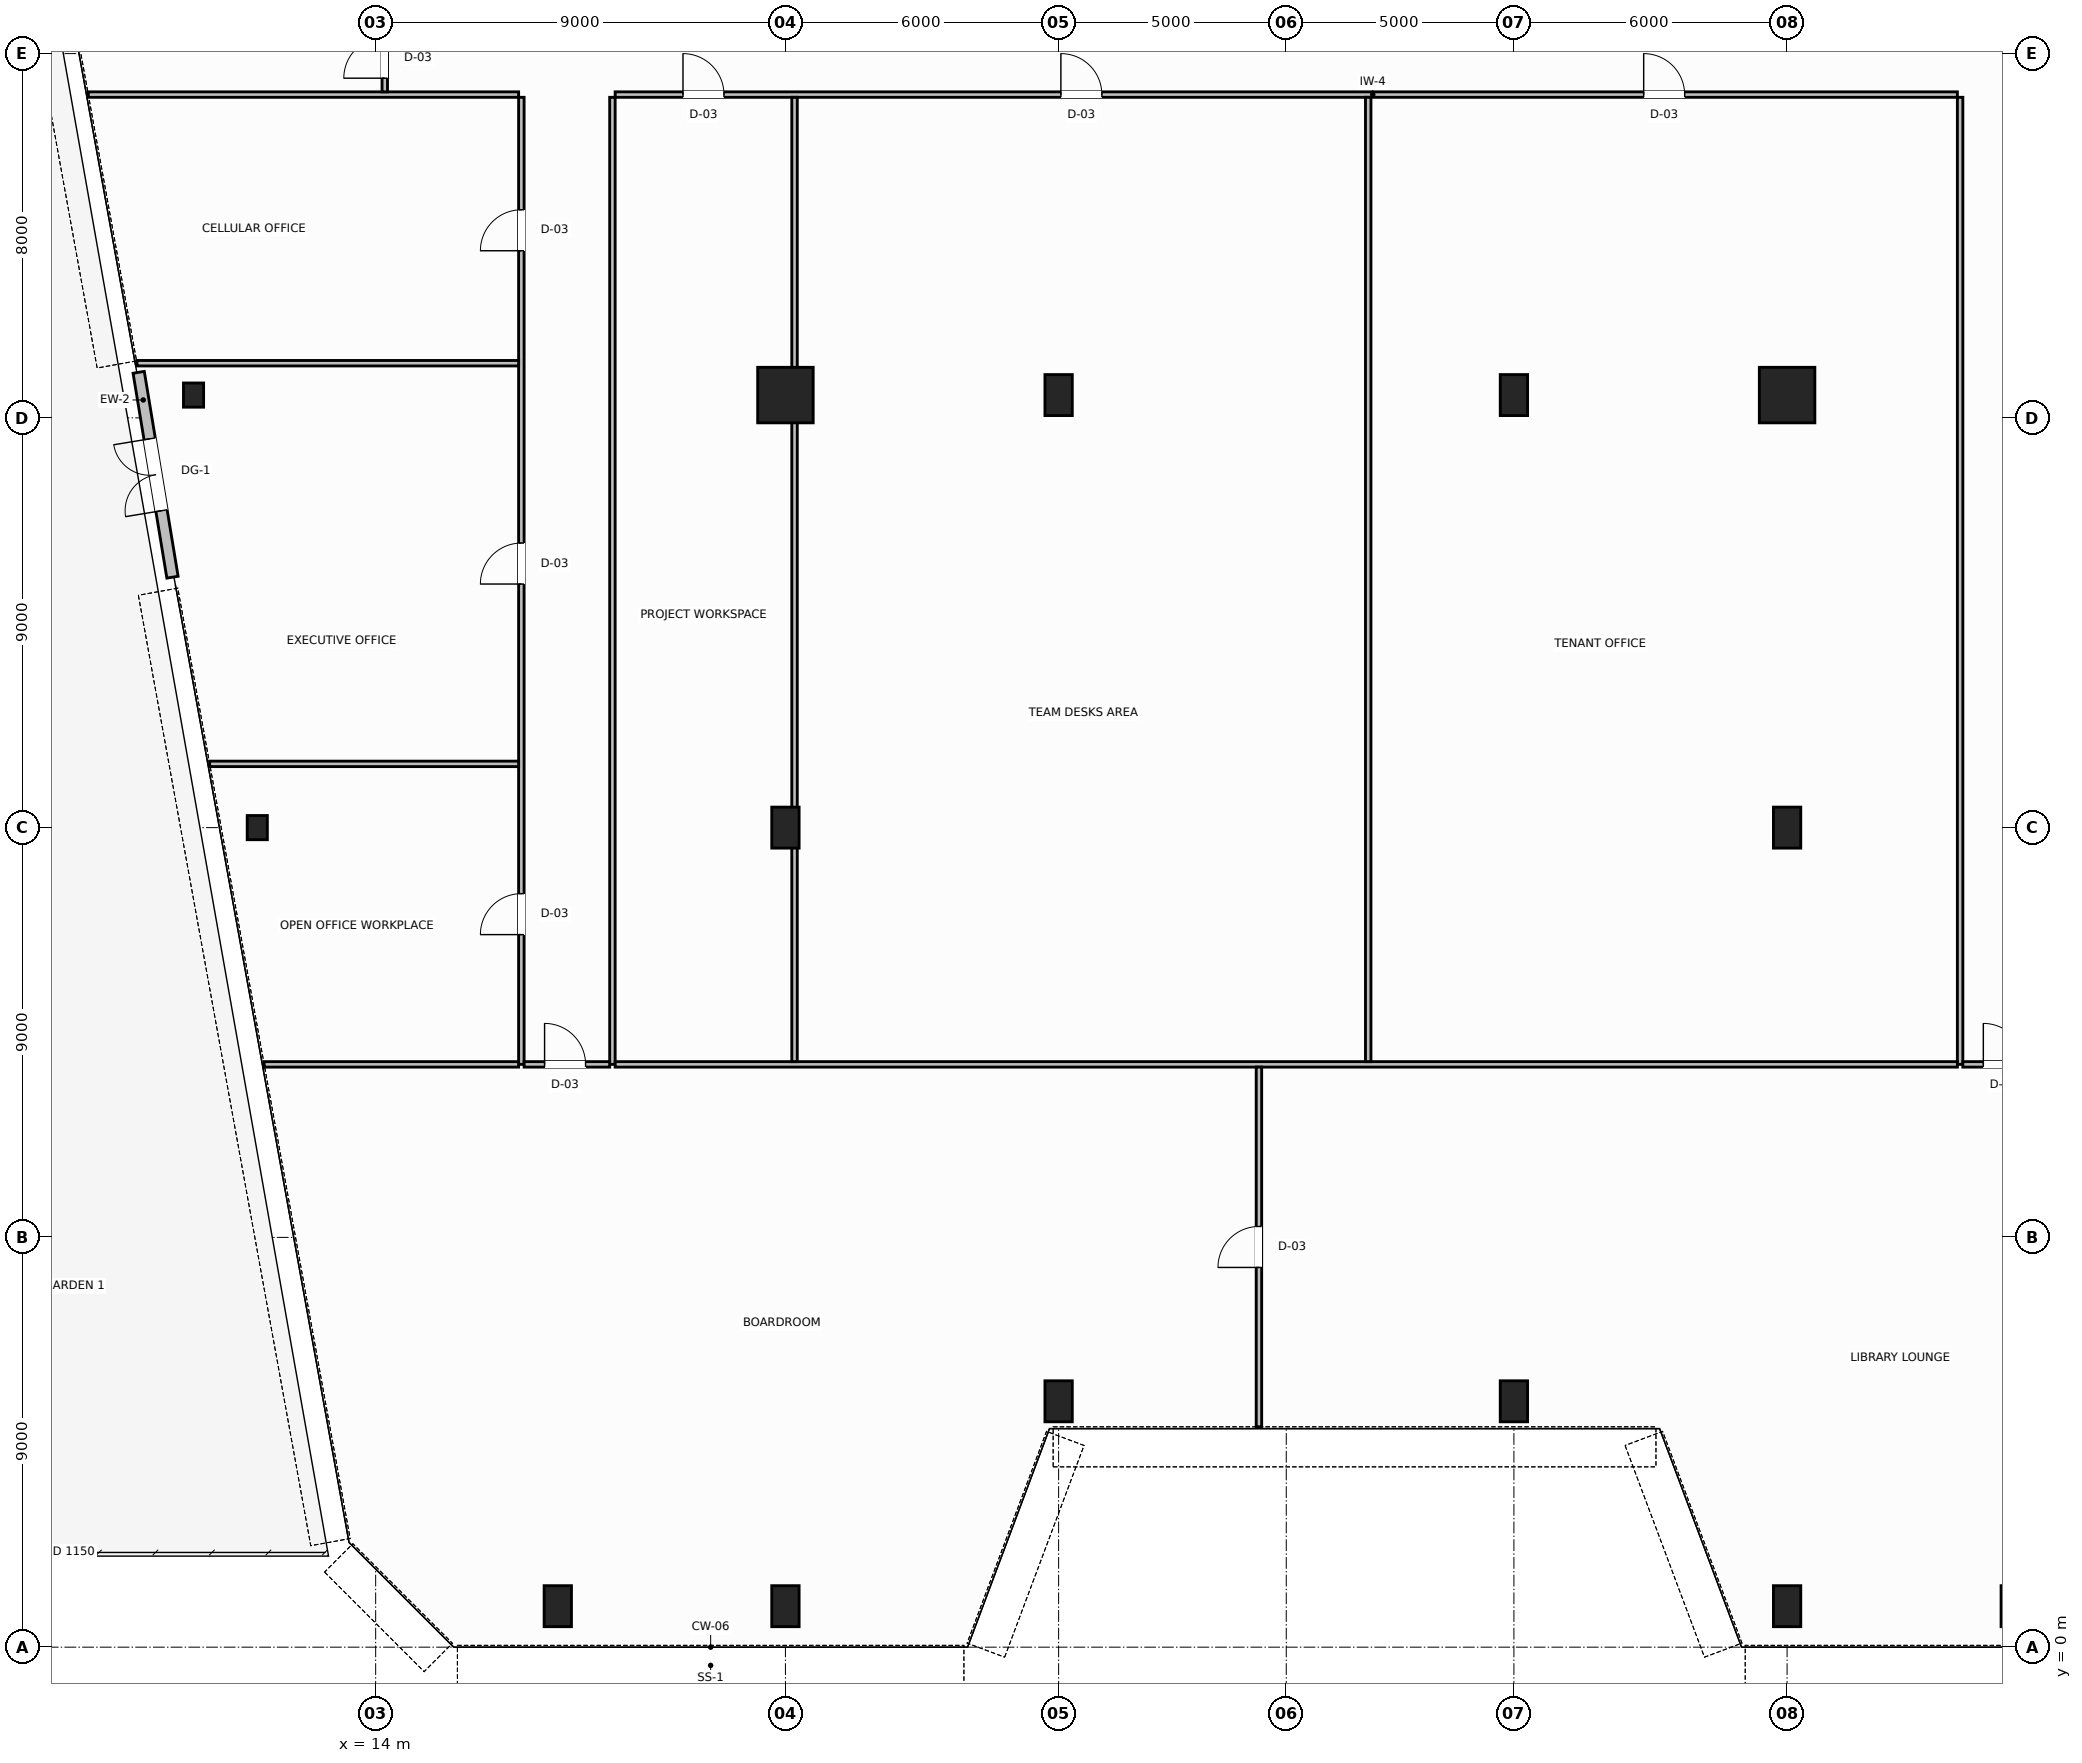
"""IFC4 building model, lengths in metres.
Left out: names, types, materials, properties, quantities, classifications, styles, units other than length and angle.
Written with IfcOpenShell. Run it as: python <this file> out.ifc"""

import sys

from ifc_helpers import new_model, si_unit, direction, frame, frame_2d, origin, origin_2d, place, context, subcontext, project, spatial, rectangle, hollow_rectangle, hollow_circle, i_section, extrude, source, transform, mapped, element, fill, save


model = new_model("IFC4")
c1 = context("Model", 3, precision=1e-05, world=origin(), true_north=direction((0.0, 1.0)))
c2 = subcontext(c1, "Body", "Model", "MODEL_VIEW")
j1 = project(units=[si_unit("LENGTHUNIT", "METRE"), si_unit("PLANEANGLEUNIT", "RADIAN")], contexts=[c1])
p1 = place(None, origin())
s1 = spatial("IfcSite", under=j1, at=p1, CompositionType="ELEMENT")
p2 = place(p1, origin())
s2 = spatial("IfcBuilding", under=s1, at=p2, CompositionType="ELEMENT")
p3 = place(p2, frame((0.0, 0.0, 18.8)))
s3 = spatial("IfcBuildingStorey", under=s2, at=p3, CompositionType="ELEMENT", Elevation=18.8)
m1 = source(origin(), c2, "Body", "SweptSolid", [
    extrude(i_section(OverallWidth=0.442, OverallDepth=0.531, WebThickness=0.065, FlangeThickness=0.076, FilletRadius=0.015, at=origin_2d()), origin(), (0.0, 0.0, 1.0), 3.8),
])
for number, where, z_axis, x_axis in (
    (1, (10.0, 27.5, 0.0), (0.0, 0.0, 1.0), (1.0, 0.0, 0.0)),
    (2, (11.4, 18.0, 0.0), (0.0, 0.0, 1.0), (1.0, 0.0, 0.0)),
):
    element("IfcColumn", number, at=place(p3, frame(where, z_axis=z_axis, x_axis=x_axis)), inside=s3, PredefinedType="COLUMN", context=c2, shape_type="MappedRepresentation", body=[
        mapped(m1, transform((0.0, 0.0, 0.0), scale=1.0)),
    ])
m2 = source(origin(), c2, "Body", "SweptSolid", [
    extrude(hollow_circle(Radius=0.61, WallThickness=0.05, at=origin_2d()), origin(), (0.0, 0.0, 1.0), 3.8),
])
p4 = place(p3, frame((23.0, 27.5, 0.0), z_axis=(0.0, 0.0, 1.0), x_axis=(1.0, 0.0, 0.0)))
e3 = element("IfcColumn", 3, at=p4, inside=s3, PredefinedType="COLUMN", context=c2, shape_type="MappedRepresentation", body=[
    mapped(m2, transform((0.0, 0.0, 0.0), scale=1.0)),
])
m3 = source(origin(), c2, "Body", "SweptSolid", [
    extrude(hollow_rectangle(XDim=0.6, YDim=0.9, WallThickness=0.04, InnerFilletRadius=0.04, OuterFilletRadius=0.08, at=origin_2d()), origin(), (0.0, 0.0, 1.0), 4.08),
])
for number, where, z_axis, x_axis in (
    (4, (29.0, 27.5, -0.28), (0.0, 0.0, 1.0), (1.0, 0.0, 0.0)),
    (5, (39.0, 27.5, -0.28), (0.0, 0.0, 1.0), (1.0, 0.0, 0.0)),
):
    element("IfcColumn", number, at=place(p3, frame(where, z_axis=z_axis, x_axis=x_axis)), inside=s3, PredefinedType="COLUMN", context=c2, shape_type="MappedRepresentation", body=[
        mapped(m3, transform((0.0, 0.0, 0.0), scale=1.0)),
    ])
p5 = place(p3, frame((45.0, 27.5, 0.0), z_axis=(0.0, 0.0, 1.0), x_axis=(1.0, 0.0, 0.0)))
e6 = element("IfcColumn", 6, at=p5, inside=s3, PredefinedType="COLUMN", context=c2, shape_type="MappedRepresentation", body=[
    mapped(m2, transform((0.0, 0.0, 0.0), scale=1.0)),
])
for number, where, z_axis, x_axis in (
    (7, (23.0, 18.0, -0.28), (0.0, 0.0, 1.0), (1.0, 0.0, 0.0)),
    (8, (45.0, 18.0, -0.28), (0.0, 0.0, 1.0), (1.0, 0.0, 0.0)),
):
    element("IfcColumn", number, at=place(p3, frame(where, z_axis=z_axis, x_axis=x_axis)), inside=s3, PredefinedType="COLUMN", context=c2, shape_type="MappedRepresentation", body=[
        mapped(m3, transform((0.0, 0.0, 0.0), scale=1.0)),
    ])
m4 = source(origin(), c2, "Body", "SweptSolid", [
    extrude(hollow_rectangle(XDim=0.6, YDim=0.9, WallThickness=0.04, InnerFilletRadius=0.04, OuterFilletRadius=0.08, at=origin_2d()), origin(), (0.0, 0.0, 1.0), 3.744),
])
for number, where, z_axis, x_axis in (
    (9, (18.0, 0.9, 0.032), (0.0, 0.064, 0.998), (-1.0, 0.0, 0.0)),
    (10, (23.0, 0.9, 0.032), (0.0, 0.064, 0.998), (-1.0, 0.0, 0.0)),
    (11, (29.0, 5.4, 0.032), (0.0, 0.064, 0.998), (-1.0, 0.0, 0.0)),
    (12, (39.0, 5.4, 0.032), (0.0, 0.064, 0.998), (-1.0, 0.0, 0.0)),
    (13, (45.0, 0.9, 0.032), (0.0, 0.064, 0.998), (-1.0, 0.0, 0.0)),
    (14, (50.0, 0.9, 0.032), (0.0, 0.064, 0.998), (-1.0, 0.0, 0.0)),
):
    element("IfcColumn", number, at=place(p3, frame(where, z_axis=z_axis, x_axis=x_axis)), inside=s3, PredefinedType="COLUMN", context=c2, shape_type="MappedRepresentation", body=[
        mapped(m4, transform((0.0, 0.0, 0.0), scale=1.0)),
    ])
p6 = place(p3, frame((9.538, 23.5, 0.0), z_axis=(0.0, 0.0, 1.0), x_axis=(-0.162836302539, 0.98665309941, 0.0)))
e15 = element("IfcWall", 15, at=p6, inside=s3, PredefinedType="STANDARD", context=c2, shape_type="SweptSolid", body=[
    extrude(rectangle(XDim=4.561, YDim=0.25, at=frame_2d((2.28, 0.0))), origin(), (0.0, 0.0, 1.0), 3.58),
])
p7 = place(p6, frame((1.48, 0.0, 0.0)))
e16 = element("IfcOpeningElement", 16, at=p7, cuts=e15, PredefinedType="OPENING", context=c2, shape_type="SweptSolid", body=[
    extrude(rectangle(XDim=1.6, YDim=2.3, at=frame_2d((0.8, 1.15))), frame((0.0, 0.135, 0.0), z_axis=(0.0, -1.0, 0.0), x_axis=(1.0, 0.0, 0.0)), (0.0, 0.0, 1.0), 0.27),
])
p8 = place(p3, frame((19.26, 34.1, 0.0), z_axis=(0.0, 0.0, 1.0), x_axis=(1.0, 0.0, 0.0)))
e17 = element("IfcWall", 17, at=p8, inside=s3, PredefinedType="PARTITIONING", context=c2, shape_type="SweptSolid", body=[
    extrude(rectangle(XDim=29.48, YDim=0.12, at=frame_2d((14.74, 0.0))), origin(), (0.0, 0.0, 1.0), 3.58),
])
p9 = place(p8, frame((1.49, 0.0, 0.0)))
e18 = element("IfcOpeningElement", 18, at=p9, cuts=e17, PredefinedType="OPENING", context=c2, shape_type="SweptSolid", body=[
    extrude(rectangle(XDim=0.9, YDim=2.15, at=frame_2d((0.45, 1.075))), frame((0.0, 0.07, 0.0), z_axis=(0.0, -1.0, 0.0), x_axis=(1.0, 0.0, 0.0)), (0.0, 0.0, 1.0), 0.14),
])
p10 = place(p8, frame((9.79, 0.0, 0.0)))
e19 = element("IfcOpeningElement", 19, at=p10, cuts=e17, PredefinedType="OPENING", context=c2, shape_type="SweptSolid", body=[
    extrude(rectangle(XDim=0.9, YDim=2.15, at=frame_2d((0.45, 1.075))), frame((0.0, 0.07, 0.0), z_axis=(0.0, -1.0, 0.0), x_axis=(1.0, 0.0, 0.0)), (0.0, 0.0, 1.0), 0.14),
])
p11 = place(p8, frame((22.59, 0.0, 0.0)))
e20 = element("IfcOpeningElement", 20, at=p11, cuts=e17, PredefinedType="OPENING", context=c2, shape_type="SweptSolid", body=[
    extrude(rectangle(XDim=0.9, YDim=2.15, at=frame_2d((0.45, 1.075))), frame((0.0, 0.07, 0.0), z_axis=(0.0, -1.0, 0.0), x_axis=(1.0, 0.0, 0.0)), (0.0, 0.0, 1.0), 0.14),
])
p12 = place(p3, frame((7.688, 34.1, 0.0), z_axis=(0.0, 0.0, 1.0), x_axis=(1.0, 0.0, 0.0)))
e21 = element("IfcWall", 21, at=p12, inside=s3, PredefinedType="PARTITIONING", context=c2, shape_type="SweptSolid", body=[
    extrude(rectangle(XDim=9.452, YDim=0.12, at=frame_2d((4.726, 0.0))), origin(), (0.0, 0.0, 1.0), 3.58),
])
p13 = place(p3, frame((14.2, 34.16, 0.0), z_axis=(0.0, 0.0, 1.0), x_axis=(0.0, 1.0, 0.0)))
e22 = element("IfcWall", 22, at=p13, inside=s3, PredefinedType="PARTITIONING", context=c2, shape_type="SweptSolid", body=[
    extrude(rectangle(XDim=2.28, YDim=0.12, at=frame_2d((1.14, 0.0))), origin(), (0.0, 0.0, 1.0), 3.58),
])
p14 = place(p13, frame((0.3, 0.0, 0.0)))
e23 = element("IfcOpeningElement", 23, at=p14, cuts=e22, PredefinedType="OPENING", context=c2, shape_type="SweptSolid", body=[
    extrude(rectangle(XDim=0.9, YDim=2.15, at=frame_2d((0.45, 1.075))), frame((0.0, 0.07, 0.0), z_axis=(0.0, -1.0, 0.0), x_axis=(1.0, 0.0, 0.0)), (0.0, 0.0, 1.0), 0.14),
])
p15 = place(p3, frame((17.2, 12.8, 0.0), z_axis=(0.0, 0.0, 1.0), x_axis=(0.0, 1.0, 0.0)))
e24 = element("IfcWall", 24, at=p15, inside=s3, PredefinedType="PARTITIONING", context=c2, shape_type="SweptSolid", body=[
    extrude(rectangle(XDim=21.24, YDim=0.12, at=frame_2d((10.62, 0.0))), origin(), (0.0, 0.0, 1.0), 3.58),
])
p16 = place(p15, frame((2.85, 0.0, 0.0)))
e25 = element("IfcOpeningElement", 25, at=p16, cuts=e24, PredefinedType="OPENING", context=c2, shape_type="SweptSolid", body=[
    extrude(rectangle(XDim=0.9, YDim=2.15, at=frame_2d((0.45, 1.075))), frame((0.0, 0.07, 0.0), z_axis=(0.0, -1.0, 0.0), x_axis=(1.0, 0.0, 0.0)), (0.0, 0.0, 1.0), 0.14),
])
p17 = place(p15, frame((10.55, 0.0, 0.0)))
e26 = element("IfcOpeningElement", 26, at=p17, cuts=e24, PredefinedType="OPENING", context=c2, shape_type="SweptSolid", body=[
    extrude(rectangle(XDim=0.9, YDim=2.15, at=frame_2d((0.45, 1.075))), frame((0.0, 0.07, 0.0), z_axis=(0.0, -1.0, 0.0), x_axis=(1.0, 0.0, 0.0)), (0.0, 0.0, 1.0), 0.14),
])
p18 = place(p15, frame((17.87, 0.0, 0.0)))
e27 = element("IfcOpeningElement", 27, at=p18, cuts=e24, PredefinedType="OPENING", context=c2, shape_type="SweptSolid", body=[
    extrude(rectangle(XDim=0.9, YDim=2.15, at=frame_2d((0.45, 1.075))), frame((0.0, 0.07, 0.0), z_axis=(0.0, -1.0, 0.0), x_axis=(1.0, 0.0, 0.0)), (0.0, 0.0, 1.0), 0.14),
])
for number, where, z_axis, x_axis in (
    (28, (19.2, 12.8, 0.0), (0.0, 0.0, 1.0), (0.0, 1.0, 0.0)),
    (29, (48.8, 12.8, 0.0), (0.0, 0.0, 1.0), (0.0, 1.0, 0.0)),
):
    element("IfcWall", number, at=place(p3, frame(where, z_axis=z_axis, x_axis=x_axis)), inside=s3, PredefinedType="PARTITIONING", context=c2, shape_type="SweptSolid", body=[
        extrude(rectangle(XDim=21.24, YDim=0.12, at=frame_2d((10.62, 0.0))), origin(), (0.0, 0.0, 1.0), 3.58),
    ])
p19 = place(p3, frame((17.26, 12.8, 0.0), z_axis=(0.0, 0.0, 1.0), x_axis=(1.0, 0.0, 0.0)))
e30 = element("IfcWall", 30, at=p19, inside=s3, PredefinedType="PARTITIONING", context=c2, shape_type="SweptSolid", body=[
    extrude(rectangle(XDim=1.88, YDim=0.12, at=frame_2d((0.94, 0.0))), origin(), (0.0, 0.0, 1.0), 3.58),
])
p20 = place(p19, frame((0.45, 0.0, 0.0)))
e31 = element("IfcOpeningElement", 31, at=p20, cuts=e30, PredefinedType="OPENING", context=c2, shape_type="SweptSolid", body=[
    extrude(rectangle(XDim=0.9, YDim=2.15, at=frame_2d((0.45, 1.075))), frame((0.0, 0.07, 0.0), z_axis=(0.0, -1.0, 0.0), x_axis=(1.0, 0.0, 0.0)), (0.0, 0.0, 1.0), 0.14),
])
p21 = place(p3, frame((48.86, 12.8, 0.0), z_axis=(0.0, 0.0, 1.0), x_axis=(1.0, 0.0, 0.0)))
e32 = element("IfcWall", 32, at=p21, inside=s3, PredefinedType="PARTITIONING", context=c2, shape_type="SweptSolid", body=[
    extrude(rectangle(XDim=1.88, YDim=0.12, at=frame_2d((0.94, 0.0))), origin(), (0.0, 0.0, 1.0), 3.58),
])
p22 = place(p21, frame((0.45, 0.0, 0.0)))
e33 = element("IfcOpeningElement", 33, at=p22, cuts=e32, PredefinedType="OPENING", context=c2, shape_type="SweptSolid", body=[
    extrude(rectangle(XDim=0.9, YDim=2.15, at=frame_2d((0.45, 1.075))), frame((0.0, 0.07, 0.0), z_axis=(0.0, -1.0, 0.0), x_axis=(1.0, 0.0, 0.0)), (0.0, 0.0, 1.0), 0.14),
])
p23 = place(p3, frame((11.551, 12.8, 0.0), z_axis=(0.0, 0.0, 1.0), x_axis=(1.0, 0.0, 0.0)))
e34 = element("IfcWall", 34, at=p23, inside=s3, PredefinedType="PARTITIONING", context=c2, shape_type="SweptSolid", body=[
    extrude(rectangle(XDim=5.589, YDim=0.12, at=frame_2d((2.794, 0.0))), origin(), (0.0, 0.0, 1.0), 3.58),
])
p24 = place(p3, frame((10.354, 19.4, 0.0), z_axis=(0.0, 0.0, 1.0), x_axis=(1.0, 0.0, 0.0)))
e35 = element("IfcWall", 35, at=p24, inside=s3, PredefinedType="PARTITIONING", context=c2, shape_type="SweptSolid", body=[
    extrude(rectangle(XDim=6.786, YDim=0.12, at=frame_2d((3.393, 0.0))), origin(), (0.0, 0.0, 1.0), 3.58),
])
p25 = place(p3, frame((8.758, 28.2, 0.0), z_axis=(0.0, 0.0, 1.0), x_axis=(1.0, 0.0, 0.0)))
e36 = element("IfcWall", 36, at=p25, inside=s3, PredefinedType="PARTITIONING", context=c2, shape_type="SweptSolid", body=[
    extrude(rectangle(XDim=8.382, YDim=0.12, at=frame_2d((4.191, 0.0))), origin(), (0.0, 0.0, 1.0), 3.58),
])
p26 = place(p3, frame((19.26, 12.8, 0.0), z_axis=(0.0, 0.0, 1.0), x_axis=(1.0, 0.0, 0.0)))
e37 = element("IfcWall", 37, at=p26, inside=s3, PredefinedType="PARTITIONING", context=c2, shape_type="SweptSolid", body=[
    extrude(rectangle(XDim=29.48, YDim=0.12, at=frame_2d((14.74, 0.0))), origin(), (0.0, 0.0, 1.0), 3.58),
])
p27 = place(p3, frame((23.2, 12.86, 0.0), z_axis=(0.0, 0.0, 1.0), x_axis=(0.0, 1.0, 0.0)))
e38 = element("IfcWall", 38, at=p27, inside=s3, PredefinedType="PARTITIONING", context=c2, shape_type="SweptSolid", body=[
    extrude(rectangle(XDim=21.18, YDim=0.12, at=frame_2d((10.59, 0.0))), origin(), (0.0, 0.0, 1.0), 2.77),
])
p28 = place(p3, frame((35.8, 12.86, 0.0), z_axis=(0.0, 0.0, 1.0), x_axis=(0.0, 1.0, 0.0)))
e39 = element("IfcWall", 39, at=p28, inside=s3, PredefinedType="PARTITIONING", context=c2, shape_type="SweptSolid", body=[
    extrude(rectangle(XDim=21.18, YDim=0.12, at=frame_2d((10.59, 0.0))), origin(), (0.0, 0.0, 1.0), 3.58),
])
p29 = place(p3, frame((33.4, 4.84, 0.0), z_axis=(0.0, 0.0, 1.0), x_axis=(0.0, 1.0, 0.0)))
e40 = element("IfcWall", 40, at=p29, inside=s3, PredefinedType="PARTITIONING", context=c2, shape_type="SweptSolid", body=[
    extrude(rectangle(XDim=7.9, YDim=0.12, at=frame_2d((3.95, 0.0))), origin(), (0.0, 0.0, 1.0), 3.58),
])
p30 = place(p29, frame((3.5, 0.0, 0.0)))
e41 = element("IfcOpeningElement", 41, at=p30, cuts=e40, PredefinedType="OPENING", context=c2, shape_type="SweptSolid", body=[
    extrude(rectangle(XDim=0.9, YDim=2.15, at=frame_2d((0.45, 1.075))), frame((0.0, 0.07, 0.0), z_axis=(0.0, -1.0, 0.0), x_axis=(1.0, 0.0, 0.0)), (0.0, 0.0, 1.0), 0.14),
])
m5 = source(origin(), c2, "Body", "SweptSolid", [
    extrude(rectangle(XDim=1.6, YDim=2.3, at=frame_2d((0.8, 1.15))), frame((0.0, 0.025, 0.0), z_axis=(0.0, -1.0, 0.0), x_axis=(1.0, 0.0, 0.0)), (0.0, 0.0, 1.0), 0.05),
])
p31 = place(p7, origin())
e42 = element("IfcDoor", 42, at=p31, inside=s3, OperationType="DOUBLE_DOOR_SINGLE_SWING", PredefinedType="DOOR", context=c2, shape_type="MappedRepresentation", body=[
    mapped(m5, transform((0.0, 0.0, 0.0), scale=1.0)),
])
fill(e16, e42)
m6 = source(origin(), c2, "Body", "SweptSolid", [
    extrude(rectangle(XDim=0.9, YDim=2.15, at=frame_2d((0.45, 1.075))), frame((0.0, 0.025, 0.0), z_axis=(0.0, -1.0, 0.0), x_axis=(1.0, 0.0, 0.0)), (0.0, 0.0, 1.0), 0.05),
])
p32 = place(p14, origin())
e43 = element("IfcDoor", 43, at=p32, inside=s3, OperationType="SINGLE_SWING_LEFT", PredefinedType="DOOR", context=c2, shape_type="MappedRepresentation", body=[
    mapped(m6, transform((0.0, 0.0, 0.0), scale=1.0)),
])
fill(e23, e43)
p33 = place(p16, origin())
e44 = element("IfcDoor", 44, at=p33, inside=s3, OperationType="SINGLE_SWING_LEFT", PredefinedType="DOOR", context=c2, shape_type="MappedRepresentation", body=[
    mapped(m6, transform((0.0, 0.0, 0.0), scale=1.0)),
])
fill(e25, e44)
p34 = place(p17, origin())
e45 = element("IfcDoor", 45, at=p34, inside=s3, OperationType="SINGLE_SWING_RIGHT", PredefinedType="DOOR", context=c2, shape_type="MappedRepresentation", body=[
    mapped(m6, transform((0.0, 0.0, 0.0), scale=1.0)),
])
fill(e26, e45)
p35 = place(p18, origin())
e46 = element("IfcDoor", 46, at=p35, inside=s3, OperationType="SINGLE_SWING_LEFT", PredefinedType="DOOR", context=c2, shape_type="MappedRepresentation", body=[
    mapped(m6, transform((0.0, 0.0, 0.0), scale=1.0)),
])
fill(e27, e46)
p36 = place(p9, origin())
e47 = element("IfcDoor", 47, at=p36, inside=s3, OperationType="SINGLE_SWING_LEFT", PredefinedType="DOOR", context=c2, shape_type="MappedRepresentation", body=[
    mapped(m6, transform((0.0, 0.0, 0.0), scale=1.0)),
])
fill(e18, e47)
p37 = place(p10, origin())
e48 = element("IfcDoor", 48, at=p37, inside=s3, OperationType="SINGLE_SWING_RIGHT", PredefinedType="DOOR", context=c2, shape_type="MappedRepresentation", body=[
    mapped(m6, transform((0.0, 0.0, 0.0), scale=1.0)),
])
fill(e19, e48)
p38 = place(p11, origin())
e49 = element("IfcDoor", 49, at=p38, inside=s3, OperationType="SINGLE_SWING_LEFT", PredefinedType="DOOR", context=c2, shape_type="MappedRepresentation", body=[
    mapped(m6, transform((0.0, 0.0, 0.0), scale=1.0)),
])
fill(e20, e49)
p39 = place(p20, origin())
e50 = element("IfcDoor", 50, at=p39, inside=s3, OperationType="SINGLE_SWING_LEFT", PredefinedType="DOOR", context=c2, shape_type="MappedRepresentation", body=[
    mapped(m6, transform((0.0, 0.0, 0.0), scale=1.0)),
])
fill(e31, e50)
p40 = place(p30, origin())
e51 = element("IfcDoor", 51, at=p40, inside=s3, OperationType="SINGLE_SWING_RIGHT", PredefinedType="DOOR", context=c2, shape_type="MappedRepresentation", body=[
    mapped(m6, transform((0.0, 0.0, 0.0), scale=1.0)),
])
fill(e41, e51)
p41 = place(p22, origin())
e52 = element("IfcDoor", 52, at=p41, inside=s3, OperationType="SINGLE_SWING_RIGHT", PredefinedType="DOOR", context=c2, shape_type="MappedRepresentation", body=[
    mapped(m6, transform((0.0, 0.0, 0.0), scale=1.0)),
])
fill(e33, e52)
save(model, sys.argv[1])
